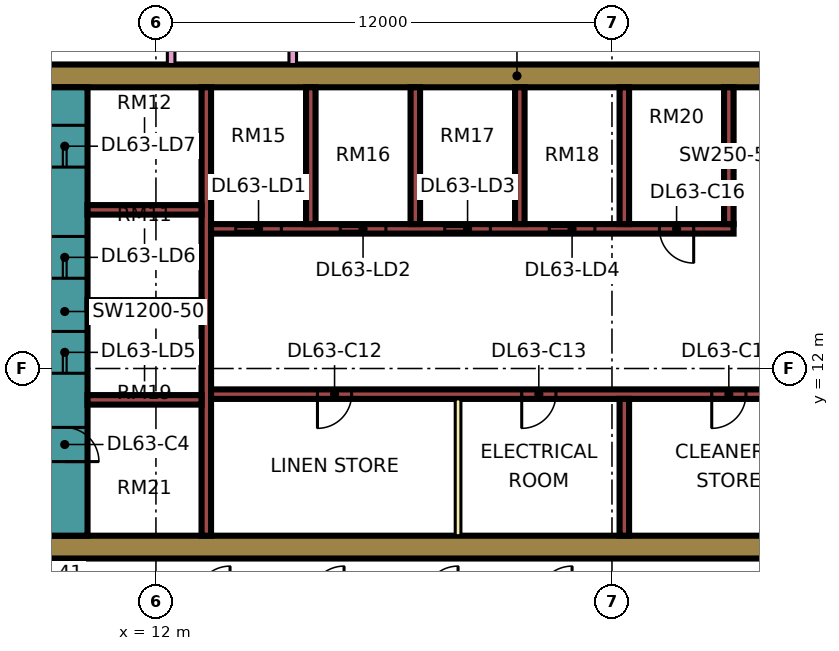
"""IFC4 building model, lengths in metres.
Left out: names, types, materials, properties, quantities, classifications, styles, units other than length and angle.
Written with IfcOpenShell. Run it as: python <this file> out.ifc"""

import sys

from ifc_helpers import new_model, si_unit, direction, frame, frame_2d, origin, place, context, subcontext, project, spatial, rectangle, extrude, element, fill, save


model = new_model("IFC4")
c1 = context("Model", 3, precision=1e-05, world=origin(), true_north=direction((0.0, 1.0)))
c2 = subcontext(c1, "Body", "Model", "MODEL_VIEW")
j1 = project(units=[si_unit("LENGTHUNIT", "METRE"), si_unit("PLANEANGLEUNIT", "RADIAN")], contexts=[c1])
p1 = place(None, origin())
s1 = spatial("IfcSite", under=j1, at=p1, CompositionType="ELEMENT")
p2 = place(p1, origin())
s2 = spatial("IfcBuilding", under=s1, at=p2, CompositionType="ELEMENT")
p3 = place(p2, frame((0.0, 0.0, 273.4)))
s3 = spatial("IfcBuildingStorey", under=s2, at=p3, CompositionType="ELEMENT", Elevation=273.4)
p4 = place(p3, frame((9.0, 7.3, 0.0), z_axis=(0.0, 0.0, 1.0), x_axis=(1.0, 0.0, 0.0)))
e1 = element("IfcWall", 1, at=p4, inside=s3, PredefinedType="SHEAR", context=c2, shape_type="SweptSolid", body=[
    extrude(rectangle(XDim=25.0, YDim=0.6, at=frame_2d((12.5, 0.0))), origin(), (0.0, 0.0, 1.0), 3.75),
])
p5 = place(p3, frame((9.0, 19.7, 0.0), z_axis=(0.0, 0.0, 1.0), x_axis=(1.0, 0.0, 0.0)))
e2 = element("IfcWall", 2, at=p5, inside=s3, PredefinedType="SHEAR", context=c2, shape_type="SweptSolid", body=[
    extrude(rectangle(XDim=25.0, YDim=0.6, at=frame_2d((12.5, 0.0))), origin(), (0.0, 0.0, 1.0), 3.75),
])
p6 = place(p5, frame((19.1, 0.0, 0.0)))
e3 = element("IfcOpeningElement", 3, at=p6, cuts=e2, PredefinedType="OPENING", context=c2, shape_type="SweptSolid", body=[
    extrude(rectangle(XDim=1.8, YDim=2.4, at=frame_2d((0.9, 1.2))), frame((0.0, 0.31, 0.0), z_axis=(0.0, -1.0, 0.0), x_axis=(1.0, 0.0, 0.0)), (0.0, 0.0, 1.0), 0.62),
])
p7 = place(p3, frame((9.6, 7.6, 0.0), z_axis=(0.0, 0.0, 1.0), x_axis=(0.0, 1.0, 0.0)))
e4 = element("IfcWall", 4, at=p7, inside=s3, PredefinedType="SHEAR", context=c2, shape_type="SweptSolid", body=[
    extrude(rectangle(XDim=11.8, YDim=1.2, at=frame_2d((5.9, 0.0))), origin(), (0.0, 0.0, 1.0), 3.75),
])
p8 = place(p7, frame((4.275, 0.0, 0.0)))
e5 = element("IfcOpeningElement", 5, at=p8, cuts=e4, PredefinedType="OPENING", context=c2, shape_type="SweptSolid", body=[
    extrude(rectangle(XDim=1.1, YDim=2.2, at=frame_2d((0.55, 1.1))), frame((0.0, 0.61, 0.0), z_axis=(0.0, -1.0, 0.0), x_axis=(1.0, 0.0, 0.0)), (0.0, 0.0, 1.0), 1.22),
])
p9 = place(p7, frame((6.775, 0.0, 0.0)))
e6 = element("IfcOpeningElement", 6, at=p9, cuts=e4, PredefinedType="OPENING", context=c2, shape_type="SweptSolid", body=[
    extrude(rectangle(XDim=1.1, YDim=2.2, at=frame_2d((0.55, 1.1))), frame((0.0, 0.61, 0.0), z_axis=(0.0, -1.0, 0.0), x_axis=(1.0, 0.0, 0.0)), (0.0, 0.0, 1.0), 1.22),
])
p10 = place(p7, frame((9.7, 0.0, 0.0)))
e7 = element("IfcOpeningElement", 7, at=p10, cuts=e4, PredefinedType="OPENING", context=c2, shape_type="SweptSolid", body=[
    extrude(rectangle(XDim=1.1, YDim=2.2, at=frame_2d((0.55, 1.1))), frame((0.0, 0.61, 0.0), z_axis=(0.0, -1.0, 0.0), x_axis=(1.0, 0.0, 0.0)), (0.0, 0.0, 1.0), 1.22),
])
p11 = place(p7, frame((1.95, 0.0, 0.0)))
e8 = element("IfcOpeningElement", 8, at=p11, cuts=e4, PredefinedType="OPENING", context=c2, shape_type="SweptSolid", body=[
    extrude(rectangle(XDim=0.9, YDim=2.1, at=frame_2d((0.45, 1.05))), frame((0.0, 0.61, 0.0), z_axis=(0.0, -1.0, 0.0), x_axis=(1.0, 0.0, 0.0)), (0.0, 0.0, 1.0), 1.22),
])
p12 = place(p3, frame((13.325, 7.6, 0.0), z_axis=(0.0, 0.0, 1.0), x_axis=(0.0, 1.0, 0.0)))
e9 = element("IfcWall", 9, at=p12, inside=s3, PredefinedType="SHEAR", context=c2, shape_type="SweptSolid", body=[
    extrude(rectangle(XDim=11.8, YDim=0.25, at=frame_2d((5.9, 0.0))), origin(), (0.0, 0.0, 1.0), 3.75),
])
p13 = place(p3, frame((13.45, 11.325, 0.0), z_axis=(0.0, 0.0, 1.0), x_axis=(1.0, 0.0, 0.0)))
e10 = element("IfcWall", 10, at=p13, inside=s3, PredefinedType="SHEAR", context=c2, shape_type="SweptSolid", body=[
    extrude(rectangle(XDim=19.95, YDim=0.25, at=frame_2d((9.975, 0.0))), origin(), (0.0, 0.0, 1.0), 3.75),
])
p14 = place(p13, frame((2.8, 0.0, 0.0)))
e11 = element("IfcOpeningElement", 11, at=p14, cuts=e10, PredefinedType="OPENING", context=c2, shape_type="SweptSolid", body=[
    extrude(rectangle(XDim=0.9, YDim=2.1, at=frame_2d((0.45, 1.05))), frame((0.0, 0.135, 0.0), z_axis=(0.0, -1.0, 0.0), x_axis=(1.0, 0.0, 0.0)), (0.0, 0.0, 1.0), 0.27),
])
p15 = place(p13, frame((8.175, 0.0, 0.0)))
e12 = element("IfcOpeningElement", 12, at=p15, cuts=e10, PredefinedType="OPENING", context=c2, shape_type="SweptSolid", body=[
    extrude(rectangle(XDim=0.9, YDim=2.1, at=frame_2d((0.45, 1.05))), frame((0.0, 0.135, 0.0), z_axis=(0.0, -1.0, 0.0), x_axis=(1.0, 0.0, 0.0)), (0.0, 0.0, 1.0), 0.27),
])
p16 = place(p13, frame((13.175, 0.0, 0.0)))
e13 = element("IfcOpeningElement", 13, at=p16, cuts=e10, PredefinedType="OPENING", context=c2, shape_type="SweptSolid", body=[
    extrude(rectangle(XDim=0.9, YDim=2.1, at=frame_2d((0.45, 1.05))), frame((0.0, 0.135, 0.0), z_axis=(0.0, -1.0, 0.0), x_axis=(1.0, 0.0, 0.0)), (0.0, 0.0, 1.0), 0.27),
])
p17 = place(p13, frame((17.65, 0.0, 0.0)))
e14 = element("IfcOpeningElement", 14, at=p17, cuts=e10, PredefinedType="OPENING", context=c2, shape_type="SweptSolid", body=[
    extrude(rectangle(XDim=0.9, YDim=2.1, at=frame_2d((0.45, 1.05))), frame((0.0, 0.135, 0.0), z_axis=(0.0, -1.0, 0.0), x_axis=(1.0, 0.0, 0.0)), (0.0, 0.0, 1.0), 0.27),
])
p18 = place(p3, frame((13.45, 15.675, 0.0), z_axis=(0.0, 0.0, 1.0), x_axis=(1.0, 0.0, 0.0)))
e15 = element("IfcWall", 15, at=p18, inside=s3, PredefinedType="SHEAR", context=c2, shape_type="SweptSolid", body=[
    extrude(rectangle(XDim=13.75, YDim=0.25, at=frame_2d((6.875, 0.0))), origin(), (0.0, 0.0, 1.0), 3.75),
])
p19 = place(p18, frame((0.65, 0.0, 0.0)))
e16 = element("IfcOpeningElement", 16, at=p19, cuts=e15, PredefinedType="OPENING", context=c2, shape_type="SweptSolid", body=[
    extrude(rectangle(XDim=1.2, YDim=2.2, at=frame_2d((0.6, 1.1))), frame((0.0, 0.135, 0.0), z_axis=(0.0, -1.0, 0.0), x_axis=(1.0, 0.0, 0.0)), (0.0, 0.0, 1.0), 0.27),
])
p20 = place(p18, frame((3.4, 0.0, 0.0)))
e17 = element("IfcOpeningElement", 17, at=p20, cuts=e15, PredefinedType="OPENING", context=c2, shape_type="SweptSolid", body=[
    extrude(rectangle(XDim=1.2, YDim=2.2, at=frame_2d((0.6, 1.1))), frame((0.0, 0.135, 0.0), z_axis=(0.0, -1.0, 0.0), x_axis=(1.0, 0.0, 0.0)), (0.0, 0.0, 1.0), 0.27),
])
p21 = place(p18, frame((6.15, 0.0, 0.0)))
e18 = element("IfcOpeningElement", 18, at=p21, cuts=e15, PredefinedType="OPENING", context=c2, shape_type="SweptSolid", body=[
    extrude(rectangle(XDim=1.2, YDim=2.2, at=frame_2d((0.6, 1.1))), frame((0.0, 0.135, 0.0), z_axis=(0.0, -1.0, 0.0), x_axis=(1.0, 0.0, 0.0)), (0.0, 0.0, 1.0), 0.27),
])
p22 = place(p18, frame((8.9, 0.0, 0.0)))
e19 = element("IfcOpeningElement", 19, at=p22, cuts=e15, PredefinedType="OPENING", context=c2, shape_type="SweptSolid", body=[
    extrude(rectangle(XDim=1.2, YDim=2.2, at=frame_2d((0.6, 1.1))), frame((0.0, 0.135, 0.0), z_axis=(0.0, -1.0, 0.0), x_axis=(1.0, 0.0, 0.0)), (0.0, 0.0, 1.0), 0.27),
])
p23 = place(p18, frame((11.8, 0.0, 0.0)))
e20 = element("IfcOpeningElement", 20, at=p23, cuts=e15, PredefinedType="OPENING", context=c2, shape_type="SweptSolid", body=[
    extrude(rectangle(XDim=0.9, YDim=2.1, at=frame_2d((0.45, 1.05))), frame((0.0, 0.135, 0.0), z_axis=(0.0, -1.0, 0.0), x_axis=(1.0, 0.0, 0.0)), (0.0, 0.0, 1.0), 0.27),
])
for number, where, z_axis, x_axis in (
    (21, (10.2, 11.175, 0.0), (0.0, 0.0, 1.0), (1.0, 0.0, 0.0)),
    (22, (10.2, 13.675, 0.0), (0.0, 0.0, 1.0), (1.0, 0.0, 0.0)),
    (23, (10.2, 16.175, 0.0), (0.0, 0.0, 1.0), (1.0, 0.0, 0.0)),
):
    element("IfcWall", number, at=place(p3, frame(where, z_axis=z_axis, x_axis=x_axis)), inside=s3, PredefinedType="SHEAR", context=c2, shape_type="SweptSolid", body=[
        extrude(rectangle(XDim=3.0, YDim=0.25, at=frame_2d((1.5, 0.0))), origin(), (0.0, 0.0, 1.0), 3.75),
    ])
for number, where, z_axis, x_axis in (
    (24, (24.325, 7.6, 0.0), (0.0, 0.0, 1.0), (0.0, 1.0, 0.0)),
    (25, (16.075, 15.8, 0.0), (0.0, 0.0, 1.0), (0.0, 1.0, 0.0)),
    (26, (18.825, 15.8, 0.0), (0.0, 0.0, 1.0), (0.0, 1.0, 0.0)),
    (27, (21.575, 15.8, 0.0), (0.0, 0.0, 1.0), (0.0, 1.0, 0.0)),
    (28, (24.325, 15.8, 0.0), (0.0, 0.0, 1.0), (0.0, 1.0, 0.0)),
    (29, (27.075, 15.8, 0.0), (0.0, 0.0, 1.0), (0.0, 1.0, 0.0)),
):
    element("IfcWall", number, at=place(p3, frame(where, z_axis=z_axis, x_axis=x_axis)), inside=s3, PredefinedType="SHEAR", context=c2, shape_type="SweptSolid", body=[
        extrude(rectangle(XDim=3.6, YDim=0.25, at=frame_2d((1.8, 0.0))), origin(), (0.0, 0.0, 1.0), 3.75),
    ])
p24 = place(p3, frame((-1.447, 12.553, 0.0), z_axis=(0.0, 0.0, 1.0), x_axis=(0.707106781187, -0.707106781187, 0.0)))
e30 = element("IfcWall", 30, at=p24, inside=s3, PredefinedType="SOLIDWALL", context=c2, shape_type="SweptSolid", body=[
    extrude(rectangle(XDim=19.799, YDim=0.15, at=frame_2d((9.899, 0.0))), origin(), (0.0, 0.0, 1.0), 3.35),
])
p25 = place(p24, frame((2.212, 0.0, 0.45)))
e31 = element("IfcOpeningElement", 31, at=p25, cuts=e30, PredefinedType="OPENING", context=c2, shape_type="SweptSolid", body=[
    extrude(rectangle(XDim=3.0, YDim=2.4, at=frame_2d((1.5, 1.2))), frame((0.0, 0.085, 0.0), z_axis=(0.0, -1.0, 0.0), x_axis=(1.0, 0.0, 0.0)), (0.0, 0.0, 1.0), 0.17),
])
p26 = place(p24, frame((10.216, 0.0, 0.45)))
e32 = element("IfcOpeningElement", 32, at=p26, cuts=e30, PredefinedType="OPENING", context=c2, shape_type="SweptSolid", body=[
    extrude(rectangle(XDim=3.0, YDim=2.4, at=frame_2d((1.5, 1.2))), frame((0.0, 0.085, 0.0), z_axis=(0.0, -1.0, 0.0), x_axis=(1.0, 0.0, 0.0)), (0.0, 0.0, 1.0), 0.17),
])
p27 = place(p3, frame((19.95, 7.6, 0.0), z_axis=(0.0, 0.0, 1.0), x_axis=(0.0, 1.0, 0.0)))
e33 = element("IfcWall", 33, at=p27, inside=s3, PredefinedType="PARTITIONING", context=c2, shape_type="SweptSolid", body=[
    extrude(rectangle(XDim=3.6, YDim=0.15, at=frame_2d((1.8, 0.0))), origin(), (0.0, 0.0, 1.0), 3.35),
])
p28 = place(p3, frame((12.4, 20.0, 0.0), z_axis=(0.0, 0.0, 1.0), x_axis=(0.0, 1.0, 0.0)))
e34 = element("IfcWall", 34, at=p28, inside=s3, PredefinedType="PARTITIONING", context=c2, shape_type="SweptSolid", body=[
    extrude(rectangle(XDim=34.0, YDim=0.2, at=frame_2d((17.0, 0.0))), origin(), (0.0, 0.0, 1.0), 3.35),
])
p29 = place(p28, frame((16.95, 0.0, 0.0)))
e35 = element("IfcOpeningElement", 35, at=p29, cuts=e34, PredefinedType="OPENING", context=c2, shape_type="SweptSolid", body=[
    extrude(rectangle(XDim=1.0, YDim=2.1, at=frame_2d((0.5, 1.05))), frame((0.0, 0.11, 0.0), z_axis=(0.0, -1.0, 0.0), x_axis=(1.0, 0.0, 0.0)), (0.0, 0.0, 1.0), 0.22),
])
p30 = place(p28, frame((0.6, 0.0, 0.0)))
e36 = element("IfcOpeningElement", 36, at=p30, cuts=e34, PredefinedType="OPENING", context=c2, shape_type="SweptSolid", body=[
    extrude(rectangle(XDim=1.2, YDim=2.1, at=frame_2d((0.6, 1.05))), frame((0.0, 0.11, 0.0), z_axis=(0.0, -1.0, 0.0), x_axis=(1.0, 0.0, 0.0)), (0.0, 0.0, 1.0), 0.22),
])
p31 = place(p28, frame((13.65, 0.0, 0.0)))
e37 = element("IfcOpeningElement", 37, at=p31, cuts=e34, PredefinedType="OPENING", context=c2, shape_type="SweptSolid", body=[
    extrude(rectangle(XDim=1.0, YDim=2.1, at=frame_2d((0.5, 1.05))), frame((0.0, 0.11, 0.0), z_axis=(0.0, -1.0, 0.0), x_axis=(1.0, 0.0, 0.0)), (0.0, 0.0, 1.0), 0.22),
])
p32 = place(p3, frame((15.6, 20.0, 0.0), z_axis=(0.0, 0.0, 1.0), x_axis=(0.0, 1.0, 0.0)))
e38 = element("IfcWall", 38, at=p32, inside=s3, PredefinedType="PARTITIONING", context=c2, shape_type="SweptSolid", body=[
    extrude(rectangle(XDim=27.775, YDim=0.2, at=frame_2d((13.887, 0.0))), origin(), (0.0, 0.0, 1.0), 3.35),
])
p33 = place(p32, frame((5.95, 0.0, 0.0)))
e39 = element("IfcOpeningElement", 39, at=p33, cuts=e38, PredefinedType="OPENING", context=c2, shape_type="SweptSolid", body=[
    extrude(rectangle(XDim=1.0, YDim=2.1, at=frame_2d((0.5, 1.05))), frame((0.0, 0.11, 0.0), z_axis=(0.0, -1.0, 0.0), x_axis=(1.0, 0.0, 0.0)), (0.0, 0.0, 1.0), 0.22),
])
p34 = place(p32, frame((12.0, 0.0, 0.0)))
e40 = element("IfcOpeningElement", 40, at=p34, cuts=e38, PredefinedType="OPENING", context=c2, shape_type="SweptSolid", body=[
    extrude(rectangle(XDim=1.0, YDim=2.1, at=frame_2d((0.5, 1.05))), frame((0.0, 0.11, 0.0), z_axis=(0.0, -1.0, 0.0), x_axis=(1.0, 0.0, 0.0)), (0.0, 0.0, 1.0), 0.22),
])
p35 = place(p32, frame((16.9, 0.0, 0.0)))
e41 = element("IfcOpeningElement", 41, at=p35, cuts=e38, PredefinedType="OPENING", context=c2, shape_type="SweptSolid", body=[
    extrude(rectangle(XDim=1.0, YDim=2.1, at=frame_2d((0.5, 1.05))), frame((0.0, 0.11, 0.0), z_axis=(0.0, -1.0, 0.0), x_axis=(1.0, 0.0, 0.0)), (0.0, 0.0, 1.0), 0.22),
])
p36 = place(p32, frame((1.15, 0.0, 0.0)))
e42 = element("IfcOpeningElement", 42, at=p36, cuts=e38, PredefinedType="OPENING", context=c2, shape_type="SweptSolid", body=[
    extrude(rectangle(XDim=1.8, YDim=2.1, at=frame_2d((0.9, 1.05))), frame((0.0, 0.11, 0.0), z_axis=(0.0, -1.0, 0.0), x_axis=(1.0, 0.0, 0.0)), (0.0, 0.0, 1.0), 0.22),
])
p37 = place(p32, frame((25.9, 0.0, 0.0)))
e43 = element("IfcOpeningElement", 43, at=p37, cuts=e38, PredefinedType="OPENING", context=c2, shape_type="SweptSolid", body=[
    extrude(rectangle(XDim=1.0, YDim=2.1, at=frame_2d((0.5, 1.05))), frame((0.0, 0.11, 0.0), z_axis=(0.0, -1.0, 0.0), x_axis=(1.0, 0.0, 0.0)), (0.0, 0.0, 1.0), 0.22),
])
p38 = place(p19, origin())
e44 = element("IfcDoor", 44, at=p38, inside=s3, OperationType="DOUBLE_DOOR_SLIDING", PredefinedType="DOOR", context=c2, shape_type="SweptSolid", body=[
    extrude(rectangle(XDim=1.2, YDim=2.2, at=frame_2d((0.6, 1.1))), frame((0.0, 0.025, 0.0), z_axis=(0.0, -1.0, 0.0), x_axis=(1.0, 0.0, 0.0)), (0.0, 0.0, 1.0), 0.05),
])
fill(e16, e44)
p39 = place(p20, origin())
e45 = element("IfcDoor", 45, at=p39, inside=s3, OperationType="DOUBLE_DOOR_SLIDING", PredefinedType="DOOR", context=c2, shape_type="SweptSolid", body=[
    extrude(rectangle(XDim=1.2, YDim=2.2, at=frame_2d((0.6, 1.1))), frame((0.0, 0.025, 0.0), z_axis=(0.0, -1.0, 0.0), x_axis=(1.0, 0.0, 0.0)), (0.0, 0.0, 1.0), 0.05),
])
fill(e17, e45)
p40 = place(p21, origin())
e46 = element("IfcDoor", 46, at=p40, inside=s3, OperationType="DOUBLE_DOOR_SLIDING", PredefinedType="DOOR", context=c2, shape_type="SweptSolid", body=[
    extrude(rectangle(XDim=1.2, YDim=2.2, at=frame_2d((0.6, 1.1))), frame((0.0, 0.025, 0.0), z_axis=(0.0, -1.0, 0.0), x_axis=(1.0, 0.0, 0.0)), (0.0, 0.0, 1.0), 0.05),
])
fill(e18, e46)
p41 = place(p22, origin())
e47 = element("IfcDoor", 47, at=p41, inside=s3, OperationType="DOUBLE_DOOR_SLIDING", PredefinedType="DOOR", context=c2, shape_type="SweptSolid", body=[
    extrude(rectangle(XDim=1.2, YDim=2.2, at=frame_2d((0.6, 1.1))), frame((0.0, 0.025, 0.0), z_axis=(0.0, -1.0, 0.0), x_axis=(1.0, 0.0, 0.0)), (0.0, 0.0, 1.0), 0.05),
])
fill(e19, e47)
p42 = place(p8, origin())
e48 = element("IfcDoor", 48, at=p42, inside=s3, OperationType="DOUBLE_DOOR_SLIDING", PredefinedType="DOOR", context=c2, shape_type="SweptSolid", body=[
    extrude(rectangle(XDim=1.1, YDim=2.2, at=frame_2d((0.55, 1.1))), frame((0.0, 0.025, 0.0), z_axis=(0.0, -1.0, 0.0), x_axis=(1.0, 0.0, 0.0)), (0.0, 0.0, 1.0), 0.05),
])
fill(e5, e48)
p43 = place(p9, origin())
e49 = element("IfcDoor", 49, at=p43, inside=s3, OperationType="DOUBLE_DOOR_SLIDING", PredefinedType="DOOR", context=c2, shape_type="SweptSolid", body=[
    extrude(rectangle(XDim=1.1, YDim=2.2, at=frame_2d((0.55, 1.1))), frame((0.0, 0.025, 0.0), z_axis=(0.0, -1.0, 0.0), x_axis=(1.0, 0.0, 0.0)), (0.0, 0.0, 1.0), 0.05),
])
fill(e6, e49)
p44 = place(p10, origin())
e50 = element("IfcDoor", 50, at=p44, inside=s3, OperationType="DOUBLE_DOOR_SLIDING", PredefinedType="DOOR", context=c2, shape_type="SweptSolid", body=[
    extrude(rectangle(XDim=1.1, YDim=2.2, at=frame_2d((0.55, 1.1))), frame((0.0, 0.025, 0.0), z_axis=(0.0, -1.0, 0.0), x_axis=(1.0, 0.0, 0.0)), (0.0, 0.0, 1.0), 0.05),
])
fill(e7, e50)
p45 = place(p11, frame((0.9, 0.0, 0.0), z_axis=(0.0, 0.0, 1.0), x_axis=(-1.0, 0.0, 0.0)))
e51 = element("IfcDoor", 51, at=p45, inside=s3, OperationType="SINGLE_SWING_LEFT", PredefinedType="DOOR", context=c2, shape_type="SweptSolid", body=[
    extrude(rectangle(XDim=0.9, YDim=2.1, at=frame_2d((0.45, 1.05))), frame((0.0, 0.025, 0.0), z_axis=(0.0, -1.0, 0.0), x_axis=(1.0, 0.0, 0.0)), (0.0, 0.0, 1.0), 0.05),
])
fill(e8, e51)
p46 = place(p14, frame((0.9, 0.0, 0.0), z_axis=(0.0, 0.0, 1.0), x_axis=(-1.0, 0.0, 0.0)))
e52 = element("IfcDoor", 52, at=p46, inside=s3, OperationType="SINGLE_SWING_LEFT", PredefinedType="DOOR", context=c2, shape_type="SweptSolid", body=[
    extrude(rectangle(XDim=0.9, YDim=2.1, at=frame_2d((0.45, 1.05))), frame((0.0, 0.025, 0.0), z_axis=(0.0, -1.0, 0.0), x_axis=(1.0, 0.0, 0.0)), (0.0, 0.0, 1.0), 0.05),
])
fill(e11, e52)
p47 = place(p15, frame((0.9, 0.0, 0.0), z_axis=(0.0, 0.0, 1.0), x_axis=(-1.0, 0.0, 0.0)))
e53 = element("IfcDoor", 53, at=p47, inside=s3, OperationType="SINGLE_SWING_LEFT", PredefinedType="DOOR", context=c2, shape_type="SweptSolid", body=[
    extrude(rectangle(XDim=0.9, YDim=2.1, at=frame_2d((0.45, 1.05))), frame((0.0, 0.025, 0.0), z_axis=(0.0, -1.0, 0.0), x_axis=(1.0, 0.0, 0.0)), (0.0, 0.0, 1.0), 0.05),
])
fill(e12, e53)
p48 = place(p16, frame((0.9, 0.0, 0.0), z_axis=(0.0, 0.0, 1.0), x_axis=(-1.0, 0.0, 0.0)))
e54 = element("IfcDoor", 54, at=p48, inside=s3, OperationType="SINGLE_SWING_LEFT", PredefinedType="DOOR", context=c2, shape_type="SweptSolid", body=[
    extrude(rectangle(XDim=0.9, YDim=2.1, at=frame_2d((0.45, 1.05))), frame((0.0, 0.025, 0.0), z_axis=(0.0, -1.0, 0.0), x_axis=(1.0, 0.0, 0.0)), (0.0, 0.0, 1.0), 0.05),
])
fill(e13, e54)
p49 = place(p23, origin())
e55 = element("IfcDoor", 55, at=p49, inside=s3, OperationType="SINGLE_SWING_RIGHT", PredefinedType="DOOR", context=c2, shape_type="SweptSolid", body=[
    extrude(rectangle(XDim=0.9, YDim=2.1, at=frame_2d((0.45, 1.05))), frame((0.0, 0.025, 0.0), z_axis=(0.0, -1.0, 0.0), x_axis=(1.0, 0.0, 0.0)), (0.0, 0.0, 1.0), 0.05),
])
fill(e20, e55)
save(model, sys.argv[1])
